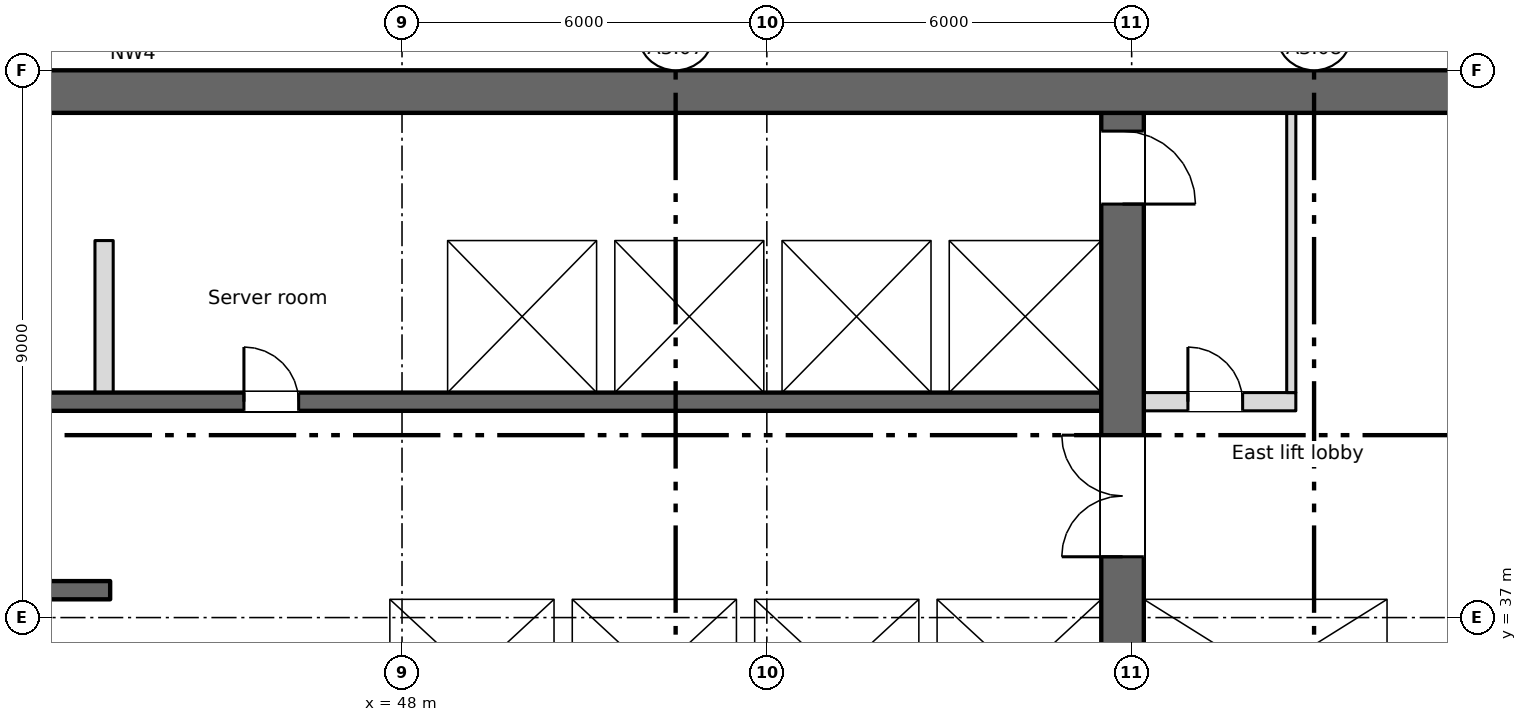
"""IFC4 building model, lengths in metres.
Left out: names, types, materials, properties, quantities, classifications, styles, units other than length and angle.
Written with IfcOpenShell. Run it as: python <this file> out.ifc"""

import sys

from ifc_helpers import new_model, si_unit, direction, frame, frame_2d, origin, place, context, subcontext, project, spatial, rectangle, extrude, element, fill, save


model = new_model("IFC4")
c1 = context("Model", 3, precision=1e-05, world=origin(), true_north=direction((0.0, 1.0)))
c2 = subcontext(c1, "Body", "Model", "MODEL_VIEW")
j1 = project(units=[si_unit("LENGTHUNIT", "METRE"), si_unit("PLANEANGLEUNIT", "RADIAN")], contexts=[c1])
p1 = place(None, origin())
s1 = spatial("IfcSite", under=j1, at=p1, CompositionType="ELEMENT")
p2 = place(p1, origin())
s2 = spatial("IfcBuilding", under=s1, at=p2, CompositionType="ELEMENT")
p3 = place(p2, frame((0.0, 0.0, 200.5)))
s3 = spatial("IfcBuildingStorey", under=s2, at=p3, CompositionType="ELEMENT", Elevation=200.5)
p4 = place(p3, frame((11.55, 45.65, 0.0), z_axis=(0.0, 0.0, 1.0), x_axis=(1.0, 0.0, 0.0)))
e1 = element("IfcWall", 1, at=p4, inside=s3, PredefinedType="SHEAR", context=c2, shape_type="SweptSolid", body=[
    extrude(rectangle(XDim=54.9, YDim=0.7, at=frame_2d((27.45, 0.0))), origin(), (0.0, 0.0, 1.0), 3.35),
])
p5 = place(p4, frame((1.2, 0.0, 0.6)))
e2 = element("IfcOpeningElement", 2, at=p5, cuts=e1, PredefinedType="OPENING", context=c2, shape_type="SweptSolid", body=[
    extrude(rectangle(XDim=0.6, YDim=2.4, at=frame_2d((0.3, 1.2))), frame((0.0, 0.36, 0.0), z_axis=(0.0, -1.0, 0.0), x_axis=(1.0, 0.0, 0.0)), (0.0, 0.0, 1.0), 0.72),
])
p6 = place(p3, frame((64.35, 34.8, 0.0), z_axis=(0.0, 0.0, 1.0), x_axis=(0.0, 1.0, 0.0)))
e3 = element("IfcWall", 3, at=p6, inside=s3, PredefinedType="SHEAR", context=c2, shape_type="SweptSolid", body=[
    extrude(rectangle(XDim=10.5, YDim=0.3, at=frame_2d((5.25, 0.0))), origin(), (0.0, 0.0, 1.0), 3.35),
])
p7 = place(p3, frame((59.85, 28.4, 0.0), z_axis=(0.0, 0.0, 1.0), x_axis=(0.0, 1.0, 0.0)))
e4 = element("IfcWall", 4, at=p7, inside=s3, PredefinedType="SHEAR", context=c2, shape_type="SweptSolid", body=[
    extrude(rectangle(XDim=16.9, YDim=0.7, at=frame_2d((8.45, 0.0))), origin(), (0.0, 0.0, 1.0), 3.35),
])
p8 = place(p7, frame((9.6, 0.0, 0.0)))
e5 = element("IfcOpeningElement", 5, at=p8, cuts=e4, PredefinedType="OPENING", context=c2, shape_type="SweptSolid", body=[
    extrude(rectangle(XDim=2.0, YDim=2.1, at=frame_2d((1.0, 1.05))), frame((0.0, 0.36, 0.0), z_axis=(0.0, -1.0, 0.0), x_axis=(1.0, 0.0, 0.0)), (0.0, 0.0, 1.0), 0.72),
])
p9 = place(p7, frame((15.4, 0.0, 0.0)))
e6 = element("IfcOpeningElement", 6, at=p9, cuts=e4, PredefinedType="OPENING", context=c2, shape_type="SweptSolid", body=[
    extrude(rectangle(XDim=1.2, YDim=2.1, at=frame_2d((0.6, 1.05))), frame((0.0, 0.36, 0.0), z_axis=(0.0, -1.0, 0.0), x_axis=(1.0, 0.0, 0.0)), (0.0, 0.0, 1.0), 0.72),
])
p10 = place(p3, frame((43.2, 37.45, 0.0), z_axis=(0.0, 0.0, 1.0), x_axis=(-1.0, 0.0, 0.0)))
e7 = element("IfcWall", 7, at=p10, inside=s3, PredefinedType="SHEAR", context=c2, shape_type="SweptSolid", body=[
    extrude(rectangle(XDim=8.4, YDim=0.3, at=frame_2d((4.2, 0.0))), origin(), (0.0, 0.0, 1.0), 3.35),
])
p11 = place(p10, frame((3.75, 0.0, 0.0)))
e8 = element("IfcOpeningElement", 8, at=p11, cuts=e7, PredefinedType="OPENING", context=c2, shape_type="SweptSolid", body=[
    extrude(rectangle(XDim=0.9, YDim=2.1, at=frame_2d((0.45, 1.05))), frame((0.0, 0.16, 0.0), z_axis=(0.0, -1.0, 0.0), x_axis=(1.0, 0.0, 0.0)), (0.0, 0.0, 1.0), 0.32),
])
p12 = place(p3, frame((47.3, 37.45, 0.0), z_axis=(0.0, 0.0, 1.0), x_axis=(1.0, 0.0, 0.0)))
e9 = element("IfcWall", 9, at=p12, inside=s3, PredefinedType="SHEAR", context=c2, shape_type="SweptSolid", body=[
    extrude(rectangle(XDim=12.2, YDim=0.3, at=frame_2d((6.1, 0.0))), origin(), (0.0, 0.0, 1.0), 3.35),
])
p13 = place(p12, frame((4.3, 0.0, 0.0)))
e10 = element("IfcOpeningElement", 10, at=p13, cuts=e9, PredefinedType="OPENING", context=c2, shape_type="SweptSolid", body=[
    extrude(rectangle(XDim=1.1, YDim=2.1, at=frame_2d((0.55, 1.05))), frame((0.0, 0.16, 0.0), z_axis=(0.0, -1.0, 0.0), x_axis=(1.0, 0.0, 0.0)), (0.0, 0.0, 1.0), 0.32),
])
p14 = place(p12, frame((7.3, 0.0, 0.0)))
e11 = element("IfcOpeningElement", 11, at=p14, cuts=e9, PredefinedType="OPENING", context=c2, shape_type="SweptSolid", body=[
    extrude(rectangle(XDim=1.1, YDim=2.1, at=frame_2d((0.55, 1.05))), frame((0.0, 0.16, 0.0), z_axis=(0.0, -1.0, 0.0), x_axis=(1.0, 0.0, 0.0)), (0.0, 0.0, 1.0), 0.32),
])
p15 = place(p12, frame((10.3, 0.0, 0.0)))
e12 = element("IfcOpeningElement", 12, at=p15, cuts=e9, PredefinedType="OPENING", context=c2, shape_type="SweptSolid", body=[
    extrude(rectangle(XDim=1.1, YDim=2.1, at=frame_2d((0.55, 1.05))), frame((0.0, 0.16, 0.0), z_axis=(0.0, -1.0, 0.0), x_axis=(1.0, 0.0, 0.0)), (0.0, 0.0, 1.0), 0.32),
])
p16 = place(p3, frame((60.2, 37.45, 0.0), z_axis=(0.0, 0.0, 1.0), x_axis=(1.0, 0.0, 0.0)))
e13 = element("IfcWall", 13, at=p16, inside=s3, PredefinedType="SHEAR", context=c2, shape_type="SweptSolid", body=[
    extrude(rectangle(XDim=4.0, YDim=0.3, at=frame_2d((2.0, 0.0))), origin(), (0.0, 0.0, 1.0), 3.35),
])
p17 = place(p16, frame((1.45, 0.0, 0.0)))
e14 = element("IfcOpeningElement", 14, at=p17, cuts=e13, PredefinedType="OPENING", context=c2, shape_type="SweptSolid", body=[
    extrude(rectangle(XDim=1.1, YDim=2.1, at=frame_2d((0.55, 1.05))), frame((0.0, 0.16, 0.0), z_axis=(0.0, -1.0, 0.0), x_axis=(1.0, 0.0, 0.0)), (0.0, 0.0, 1.0), 0.32),
])
p18 = place(p3, frame((43.05, 34.8, 0.0), z_axis=(0.0, 0.0, 1.0), x_axis=(0.0, 1.0, 0.0)))
e15 = element("IfcWall", 15, at=p18, inside=s3, PredefinedType="SHEAR", context=c2, shape_type="SweptSolid", body=[
    extrude(rectangle(XDim=2.5, YDim=0.3, at=frame_2d((1.25, 0.0))), origin(), (0.0, 0.0, 1.0), 3.35),
])
p19 = place(p3, frame((47.55, 34.8, 0.0), z_axis=(0.0, 0.0, 1.0), x_axis=(0.0, 1.0, 0.0)))
e16 = element("IfcWall", 16, at=p19, inside=s3, PredefinedType="SHEAR", context=c2, shape_type="SweptSolid", body=[
    extrude(rectangle(XDim=2.5, YDim=0.5, at=frame_2d((1.25, 0.0))), origin(), (0.0, 0.0, 1.0), 3.35),
])
p20 = place(p3, frame((50.65, 34.8, 0.0), z_axis=(0.0, 0.0, 1.0), x_axis=(0.0, 1.0, 0.0)))
e17 = element("IfcWall", 17, at=p20, inside=s3, PredefinedType="SHEAR", context=c2, shape_type="SweptSolid", body=[
    extrude(rectangle(XDim=2.5, YDim=0.3, at=frame_2d((1.25, 0.0))), origin(), (0.0, 0.0, 1.0), 3.35),
])
p21 = place(p3, frame((18.5, 40.55, 0.0), z_axis=(0.0, 0.0, 1.0), x_axis=(1.0, 0.0, 0.0)))
e18 = element("IfcWall", 18, at=p21, inside=s3, PredefinedType="SHEAR", context=c2, shape_type="SweptSolid", body=[
    extrude(rectangle(XDim=41.0, YDim=0.3, at=frame_2d((20.5, 0.0))), origin(), (0.0, 0.0, 1.0), 3.35),
])
p22 = place(p21, frame((2.15, 0.0, 0.0)))
e19 = element("IfcOpeningElement", 19, at=p22, cuts=e18, PredefinedType="OPENING", context=c2, shape_type="SweptSolid", body=[
    extrude(rectangle(XDim=0.9, YDim=2.1, at=frame_2d((0.45, 1.05))), frame((0.0, 0.16, 0.0), z_axis=(0.0, -1.0, 0.0), x_axis=(1.0, 0.0, 0.0)), (0.0, 0.0, 1.0), 0.32),
])
p23 = place(p21, frame((15.9, 0.0, 0.0)))
e20 = element("IfcOpeningElement", 20, at=p23, cuts=e18, PredefinedType="OPENING", context=c2, shape_type="SweptSolid", body=[
    extrude(rectangle(XDim=0.9, YDim=2.1, at=frame_2d((0.45, 1.05))), frame((0.0, 0.16, 0.0), z_axis=(0.0, -1.0, 0.0), x_axis=(1.0, 0.0, 0.0)), (0.0, 0.0, 1.0), 0.32),
])
p24 = place(p21, frame((21.4, 0.0, 0.0)))
e21 = element("IfcOpeningElement", 21, at=p24, cuts=e18, PredefinedType="OPENING", context=c2, shape_type="SweptSolid", body=[
    extrude(rectangle(XDim=0.9, YDim=2.1, at=frame_2d((0.45, 1.05))), frame((0.0, 0.16, 0.0), z_axis=(0.0, -1.0, 0.0), x_axis=(1.0, 0.0, 0.0)), (0.0, 0.0, 1.0), 0.32),
])
p25 = place(p21, frame((26.9, 0.0, 0.0)))
e22 = element("IfcOpeningElement", 22, at=p25, cuts=e18, PredefinedType="OPENING", context=c2, shape_type="SweptSolid", body=[
    extrude(rectangle(XDim=0.9, YDim=2.1, at=frame_2d((0.45, 1.05))), frame((0.0, 0.16, 0.0), z_axis=(0.0, -1.0, 0.0), x_axis=(1.0, 0.0, 0.0)), (0.0, 0.0, 1.0), 0.32),
])
p26 = place(p21, frame((6.175, 0.0, 0.0)))
e23 = element("IfcOpeningElement", 23, at=p26, cuts=e18, PredefinedType="OPENING", context=c2, shape_type="SweptSolid", body=[
    extrude(rectangle(XDim=1.1, YDim=2.1, at=frame_2d((0.55, 1.05))), frame((0.0, 0.16, 0.0), z_axis=(0.0, -1.0, 0.0), x_axis=(1.0, 0.0, 0.0)), (0.0, 0.0, 1.0), 0.32),
])
p27 = place(p21, frame((8.925, 0.0, 0.0)))
e24 = element("IfcOpeningElement", 24, at=p27, cuts=e18, PredefinedType="OPENING", context=c2, shape_type="SweptSolid", body=[
    extrude(rectangle(XDim=1.1, YDim=2.1, at=frame_2d((0.55, 1.05))), frame((0.0, 0.16, 0.0), z_axis=(0.0, -1.0, 0.0), x_axis=(1.0, 0.0, 0.0)), (0.0, 0.0, 1.0), 0.32),
])
p28 = place(p21, frame((11.675, 0.0, 0.0)))
e25 = element("IfcOpeningElement", 25, at=p28, cuts=e18, PredefinedType="OPENING", context=c2, shape_type="SweptSolid", body=[
    extrude(rectangle(XDim=1.1, YDim=2.1, at=frame_2d((0.55, 1.05))), frame((0.0, 0.16, 0.0), z_axis=(0.0, -1.0, 0.0), x_axis=(1.0, 0.0, 0.0)), (0.0, 0.0, 1.0), 0.32),
])
p29 = place(p21, frame((30.925, 0.0, 0.0)))
e26 = element("IfcOpeningElement", 26, at=p29, cuts=e18, PredefinedType="OPENING", context=c2, shape_type="SweptSolid", body=[
    extrude(rectangle(XDim=1.1, YDim=2.1, at=frame_2d((0.55, 1.05))), frame((0.0, 0.16, 0.0), z_axis=(0.0, -1.0, 0.0), x_axis=(1.0, 0.0, 0.0)), (0.0, 0.0, 1.0), 0.32),
])
p30 = place(p21, frame((33.675, 0.0, 0.0)))
e27 = element("IfcOpeningElement", 27, at=p30, cuts=e18, PredefinedType="OPENING", context=c2, shape_type="SweptSolid", body=[
    extrude(rectangle(XDim=1.1, YDim=2.1, at=frame_2d((0.55, 1.05))), frame((0.0, 0.16, 0.0), z_axis=(0.0, -1.0, 0.0), x_axis=(1.0, 0.0, 0.0)), (0.0, 0.0, 1.0), 0.32),
])
p31 = place(p21, frame((36.375, 0.0, 0.0)))
e28 = element("IfcOpeningElement", 28, at=p31, cuts=e18, PredefinedType="OPENING", context=c2, shape_type="SweptSolid", body=[
    extrude(rectangle(XDim=1.2, YDim=2.1, at=frame_2d((0.6, 1.05))), frame((0.0, 0.16, 0.0), z_axis=(0.0, -1.0, 0.0), x_axis=(1.0, 0.0, 0.0)), (0.0, 0.0, 1.0), 0.32),
])
p32 = place(p21, frame((39.15, 0.0, 0.0)))
e29 = element("IfcOpeningElement", 29, at=p32, cuts=e18, PredefinedType="OPENING", context=c2, shape_type="SweptSolid", body=[
    extrude(rectangle(XDim=1.2, YDim=2.1, at=frame_2d((0.6, 1.05))), frame((0.0, 0.16, 0.0), z_axis=(0.0, -1.0, 0.0), x_axis=(1.0, 0.0, 0.0)), (0.0, 0.0, 1.0), 0.32),
])
p33 = place(p3, frame((18.5, 43.35, 0.0), z_axis=(0.0, 0.0, 1.0), x_axis=(1.0, 0.0, 0.0)))
e30 = element("IfcWall", 30, at=p33, inside=s3, PredefinedType="SHEAR", context=c2, shape_type="SweptSolid", body=[
    extrude(rectangle(XDim=41.0, YDim=0.3, at=frame_2d((20.5, 0.0))), origin(), (0.0, 0.0, 1.0), 3.35),
])
p34 = place(p3, frame((60.2, 40.55, 0.0), z_axis=(0.0, 0.0, 1.0), x_axis=(1.0, 0.0, 0.0)))
e31 = element("IfcWall", 31, at=p34, inside=s3, PredefinedType="PARTITIONING", context=c2, shape_type="SweptSolid", body=[
    extrude(rectangle(XDim=2.5, YDim=0.3, at=frame_2d((1.25, 0.0))), origin(), (0.0, 0.0, 1.0), 3.35),
])
p35 = place(p34, frame((0.725, 0.0, 0.0)))
e32 = element("IfcOpeningElement", 32, at=p35, cuts=e31, PredefinedType="OPENING", context=c2, shape_type="SweptSolid", body=[
    extrude(rectangle(XDim=0.9, YDim=2.1, at=frame_2d((0.45, 1.05))), frame((0.0, 0.16, 0.0), z_axis=(0.0, -1.0, 0.0), x_axis=(1.0, 0.0, 0.0)), (0.0, 0.0, 1.0), 0.32),
])
for number, where, z_axis, x_axis in (
    (33, (53.65, 34.8, 0.0), (0.0, 0.0, 1.0), (0.0, 1.0, 0.0)),
    (34, (56.65, 34.8, 0.0), (0.0, 0.0, 1.0), (0.0, 1.0, 0.0)),
    (35, (48.6, 40.7, 0.0), (0.0, 0.0, 1.0), (0.0, 1.0, 0.0)),
    (36, (51.35, 40.7, 0.0), (0.0, 0.0, 1.0), (0.0, 1.0, 0.0)),
    (37, (54.1, 40.7, 0.0), (0.0, 0.0, 1.0), (0.0, 1.0, 0.0)),
    (38, (56.85, 40.7, 0.0), (0.0, 0.0, 1.0), (0.0, 1.0, 0.0)),
):
    element("IfcWall", number, at=place(p3, frame(where, z_axis=z_axis, x_axis=x_axis)), inside=s3, PredefinedType="SHEAR", context=c2, shape_type="SweptSolid", body=[
        extrude(rectangle(XDim=2.5, YDim=0.3, at=frame_2d((1.25, 0.0))), origin(), (0.0, 0.0, 1.0), 3.35),
    ])
p36 = place(p3, frame((62.625, 40.7, 0.0), z_axis=(0.0, 0.0, 1.0), x_axis=(0.0, 1.0, 0.0)))
e39 = element("IfcWall", 39, at=p36, inside=s3, PredefinedType="PARTITIONING", context=c2, shape_type="SweptSolid", body=[
    extrude(rectangle(XDim=4.6, YDim=0.15, at=frame_2d((2.3, 0.0))), origin(), (0.0, 0.0, 1.0), 3.35),
])
p37 = place(p3, frame((43.1, 40.7, 0.0), z_axis=(0.0, 0.0, 1.0), x_axis=(0.0, 1.0, 0.0)))
e40 = element("IfcWall", 40, at=p37, inside=s3, PredefinedType="PARTITIONING", context=c2, shape_type="SweptSolid", body=[
    extrude(rectangle(XDim=2.5, YDim=0.3, at=frame_2d((1.25, 0.0))), origin(), (0.0, 0.0, 1.0), 3.35),
])
p38 = place(p35, origin())
e41 = element("IfcDoor", 41, at=p38, inside=s3, OperationType="SINGLE_SWING_LEFT", PredefinedType="DOOR", context=c2, shape_type="SweptSolid", body=[
    extrude(rectangle(XDim=0.9, YDim=2.1, at=frame_2d((0.45, 1.05))), frame((0.0, 0.025, 0.0), z_axis=(0.0, -1.0, 0.0), x_axis=(1.0, 0.0, 0.0)), (0.0, 0.0, 1.0), 0.05),
])
fill(e32, e41)
p39 = place(p25, origin())
e42 = element("IfcDoor", 42, at=p39, inside=s3, OperationType="SINGLE_SWING_LEFT", PredefinedType="DOOR", context=c2, shape_type="SweptSolid", body=[
    extrude(rectangle(XDim=0.9, YDim=2.1, at=frame_2d((0.45, 1.05))), frame((0.0, 0.025, 0.0), z_axis=(0.0, -1.0, 0.0), x_axis=(1.0, 0.0, 0.0)), (0.0, 0.0, 1.0), 0.05),
])
fill(e22, e42)
p40 = place(p13, origin())
e43 = element("IfcDoor", 43, at=p40, inside=s3, OperationType="SLIDING_TO_LEFT", PredefinedType="DOOR", context=c2, shape_type="SweptSolid", body=[
    extrude(rectangle(XDim=1.1, YDim=2.1, at=frame_2d((0.55, 1.05))), frame((0.0, 0.025, 0.0), z_axis=(0.0, -1.0, 0.0), x_axis=(1.0, 0.0, 0.0)), (0.0, 0.0, 1.0), 0.05),
])
fill(e10, e43)
p41 = place(p14, origin())
e44 = element("IfcDoor", 44, at=p41, inside=s3, OperationType="SLIDING_TO_LEFT", PredefinedType="DOOR", context=c2, shape_type="SweptSolid", body=[
    extrude(rectangle(XDim=1.1, YDim=2.1, at=frame_2d((0.55, 1.05))), frame((0.0, 0.025, 0.0), z_axis=(0.0, -1.0, 0.0), x_axis=(1.0, 0.0, 0.0)), (0.0, 0.0, 1.0), 0.05),
])
fill(e11, e44)
p42 = place(p15, origin())
e45 = element("IfcDoor", 45, at=p42, inside=s3, OperationType="SLIDING_TO_LEFT", PredefinedType="DOOR", context=c2, shape_type="SweptSolid", body=[
    extrude(rectangle(XDim=1.1, YDim=2.1, at=frame_2d((0.55, 1.05))), frame((0.0, 0.025, 0.0), z_axis=(0.0, -1.0, 0.0), x_axis=(1.0, 0.0, 0.0)), (0.0, 0.0, 1.0), 0.05),
])
fill(e12, e45)
p43 = place(p29, origin())
e46 = element("IfcDoor", 46, at=p43, inside=s3, OperationType="SLIDING_TO_LEFT", PredefinedType="DOOR", context=c2, shape_type="SweptSolid", body=[
    extrude(rectangle(XDim=1.1, YDim=2.1, at=frame_2d((0.55, 1.05))), frame((0.0, 0.025, 0.0), z_axis=(0.0, -1.0, 0.0), x_axis=(1.0, 0.0, 0.0)), (0.0, 0.0, 1.0), 0.05),
])
fill(e26, e46)
p44 = place(p30, origin())
e47 = element("IfcDoor", 47, at=p44, inside=s3, OperationType="SLIDING_TO_LEFT", PredefinedType="DOOR", context=c2, shape_type="SweptSolid", body=[
    extrude(rectangle(XDim=1.1, YDim=2.1, at=frame_2d((0.55, 1.05))), frame((0.0, 0.025, 0.0), z_axis=(0.0, -1.0, 0.0), x_axis=(1.0, 0.0, 0.0)), (0.0, 0.0, 1.0), 0.05),
])
fill(e27, e47)
p45 = place(p31, origin())
e48 = element("IfcDoor", 48, at=p45, inside=s3, OperationType="SLIDING_TO_LEFT", PredefinedType="DOOR", context=c2, shape_type="SweptSolid", body=[
    extrude(rectangle(XDim=1.2, YDim=2.1, at=frame_2d((0.6, 1.05))), frame((0.0, 0.025, 0.0), z_axis=(0.0, -1.0, 0.0), x_axis=(1.0, 0.0, 0.0)), (0.0, 0.0, 1.0), 0.05),
])
fill(e28, e48)
p46 = place(p32, origin())
e49 = element("IfcDoor", 49, at=p46, inside=s3, OperationType="SLIDING_TO_LEFT", PredefinedType="DOOR", context=c2, shape_type="SweptSolid", body=[
    extrude(rectangle(XDim=1.2, YDim=2.1, at=frame_2d((0.6, 1.05))), frame((0.0, 0.025, 0.0), z_axis=(0.0, -1.0, 0.0), x_axis=(1.0, 0.0, 0.0)), (0.0, 0.0, 1.0), 0.05),
])
fill(e29, e49)
p47 = place(p17, origin())
e50 = element("IfcDoor", 50, at=p47, inside=s3, OperationType="SLIDING_TO_LEFT", PredefinedType="DOOR", context=c2, shape_type="SweptSolid", body=[
    extrude(rectangle(XDim=1.1, YDim=2.1, at=frame_2d((0.55, 1.05))), frame((0.0, 0.025, 0.0), z_axis=(0.0, -1.0, 0.0), x_axis=(1.0, 0.0, 0.0)), (0.0, 0.0, 1.0), 0.05),
])
fill(e14, e50)
p48 = place(p8, origin())
e51 = element("IfcDoor", 51, at=p48, inside=s3, OperationType="DOUBLE_DOOR_SINGLE_SWING", PredefinedType="DOOR", context=c2, shape_type="SweptSolid", body=[
    extrude(rectangle(XDim=2.0, YDim=2.1, at=frame_2d((1.0, 1.05))), frame((0.0, 0.025, 0.0), z_axis=(0.0, -1.0, 0.0), x_axis=(1.0, 0.0, 0.0)), (0.0, 0.0, 1.0), 0.05),
])
fill(e5, e51)
p49 = place(p9, origin())
e52 = element("IfcDoor", 52, at=p49, inside=s3, OperationType="SINGLE_SWING_LEFT", PredefinedType="DOOR", context=c2, shape_type="SweptSolid", body=[
    extrude(rectangle(XDim=1.2, YDim=2.1, at=frame_2d((0.6, 1.05))), frame((0.0, 0.025, 0.0), z_axis=(0.0, -1.0, 0.0), x_axis=(1.0, 0.0, 0.0)), (0.0, 0.0, 1.0), 0.05),
])
fill(e6, e52)
save(model, sys.argv[1])
